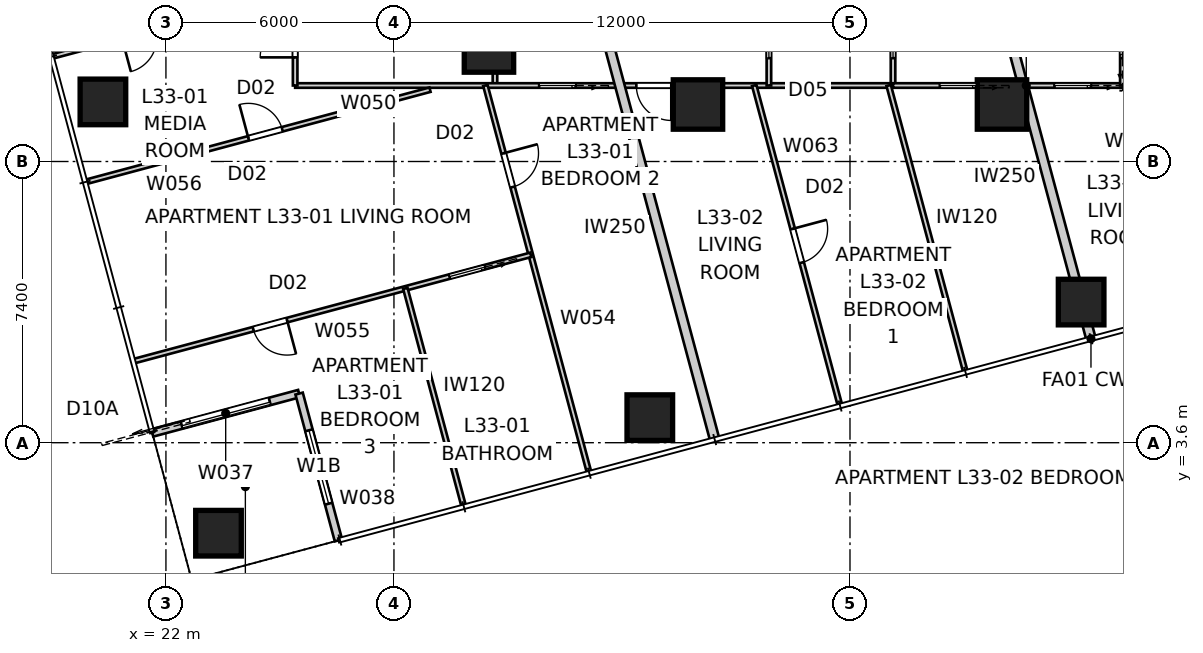
"""IFC4 building model, lengths in metres.
Left out: names, types, materials, properties, quantities, classifications, styles, units other than length and angle.
Written with IfcOpenShell. Run it as: python <this file> out.ifc"""

import sys

from ifc_helpers import new_model, si_unit, direction, frame, frame_2d, origin, origin_2d, place, context, subcontext, project, spatial, rectangle, extrude, element, fill, save


model = new_model("IFC4")
c1 = context("Model", 3, precision=1e-05, world=origin(), true_north=direction((0.0, 1.0)))
c2 = subcontext(c1, "Body", "Model", "MODEL_VIEW")
j1 = project(units=[si_unit("LENGTHUNIT", "METRE"), si_unit("PLANEANGLEUNIT", "RADIAN")], contexts=[c1])
p1 = place(None, origin())
s1 = spatial("IfcSite", under=j1, at=p1, CompositionType="ELEMENT")
p2 = place(p1, origin())
s2 = spatial("IfcBuilding", under=s1, at=p2, CompositionType="ELEMENT")
p3 = place(p2, frame((0.0, 0.0, 121.8)))
s3 = spatial("IfcBuildingStorey", under=s2, at=p3, CompositionType="ELEMENT", Elevation=121.8)
for number, where, z_axis, x_axis in (
    (1, (23.383, 1.219, 0.0), (0.0, 0.0, 1.0), (1.0, 0.0, 0.0)),
    (2, (34.733, 4.26, 0.0), (0.0, 0.0, 1.0), (1.0, 0.0, 0.0)),
    (3, (46.082, 7.301, 0.0), (0.0, 0.0, 1.0), (1.0, 0.0, 0.0)),
    (4, (20.342, 12.568, 0.0), (0.0, 0.0, 1.0), (1.0, 0.0, 0.0)),
):
    element("IfcColumn", number, at=place(p3, frame(where, z_axis=z_axis, x_axis=x_axis)), inside=s3, PredefinedType="COLUMN", context=c2, shape_type="SweptSolid", body=[
        extrude(rectangle(XDim=1.2, YDim=1.2, at=origin_2d()), origin(), (0.0, 0.0, 1.0), 3.4),
    ])
for number, where, z_axis, x_axis in (
    (5, (30.5, 14.0, 0.0), (0.0, 0.0, 1.0), (1.0, 0.0, 0.0)),
    (6, (36.0, 12.5, 0.0), (0.0, 0.0, 1.0), (1.0, 0.0, 0.0)),
    (7, (44.0, 12.5, 0.0), (0.0, 0.0, 1.0), (1.0, 0.0, 0.0)),
):
    element("IfcColumn", number, at=place(p3, frame(where, z_axis=z_axis, x_axis=x_axis)), inside=s3, PredefinedType="COLUMN", context=c2, shape_type="SweptSolid", body=[
        extrude(rectangle(XDim=1.3, YDim=1.3, at=origin_2d()), origin(), (0.0, 0.0, 1.0), 3.4),
    ])
p4 = place(p3, frame((21.641, 3.857, 0.0), z_axis=(0.0, 0.0, 1.0), x_axis=(0.965919172068, 0.258843877716, 0.0)))
e8 = element("IfcWall", 8, at=p4, inside=s3, PredefinedType="SOLIDWALL", context=c2, shape_type="SweptSolid", body=[
    extrude(rectangle(XDim=4.0, YDim=0.2, at=frame_2d((2.0, 0.0))), origin(), (0.0, 0.0, 1.0), 3.25),
])
p5 = place(p4, frame((0.8, 0.0, 0.0)))
e9 = element("IfcOpeningElement", 9, at=p5, cuts=e8, PredefinedType="OPENING", context=c2, shape_type="SweptSolid", body=[
    extrude(rectangle(XDim=2.4, YDim=2.1, at=frame_2d((1.2, 1.05))), frame((0.0, 0.11, 0.0), z_axis=(0.0, -1.0, 0.0), x_axis=(1.0, 0.0, 0.0)), (0.0, 0.0, 1.0), 0.22),
])
p6 = place(p3, frame((25.504, 4.893, 0.0), z_axis=(0.0, 0.0, 1.0), x_axis=(0.258786931944, -0.965934430412, 0.0)))
e10 = element("IfcWall", 10, at=p6, inside=s3, PredefinedType="SOLIDWALL", context=c2, shape_type="SweptSolid", body=[
    extrude(rectangle(XDim=4.0, YDim=0.2, at=frame_2d((2.0, 0.0))), origin(), (0.0, 0.0, 1.0), 3.25),
])
p7 = place(p6, frame((1.0, 0.0, 0.45)))
e11 = element("IfcOpeningElement", 11, at=p7, cuts=e10, PredefinedType="OPENING", context=c2, shape_type="SweptSolid", body=[
    extrude(rectangle(XDim=2.0, YDim=1.8, at=frame_2d((1.0, 0.9))), frame((0.0, 0.11, 0.0), z_axis=(0.0, -1.0, 0.0), x_axis=(1.0, 0.0, 0.0)), (0.0, 0.0, 1.0), 0.22),
])
p8 = place(p3, frame((36.44, 3.682, 0.0), z_axis=(0.0, 0.0, 1.0), x_axis=(-0.258824223352, 0.965924438766, 0.0)))
e12 = element("IfcWall", 12, at=p8, inside=s3, PredefinedType="PARTITIONING", context=c2, shape_type="SweptSolid", body=[
    extrude(rectangle(XDim=12.138, YDim=0.25, at=frame_2d((6.069, 0.0))), origin(), (0.0, 0.0, 1.0), 3.25),
])
p9 = place(p3, frame((46.341, 6.335, 0.0), z_axis=(0.0, 0.0, 1.0), x_axis=(-0.258814481793, 0.965927049013, 0.0)))
e13 = element("IfcWall", 13, at=p9, inside=s3, PredefinedType="PARTITIONING", context=c2, shape_type="SweptSolid", body=[
    extrude(rectangle(XDim=9.392, YDim=0.25, at=frame_2d((4.696, 0.0))), origin(), (0.0, 0.0, 1.0), 3.25),
])
p10 = place(p3, frame((30.658, 15.4, 0.0), z_axis=(0.0, 0.0, 1.0), x_axis=(0.0, -1.0, 0.0)))
e14 = element("IfcWall", 14, at=p10, inside=s3, PredefinedType="PARTITIONING", context=c2, shape_type="SweptSolid", body=[
    extrude(rectangle(XDim=2.4, YDim=0.12, at=frame_2d((1.2, 0.0))), origin(), (0.0, 0.0, 1.0), 3.25),
])
p11 = place(p3, frame((41.07, 13.0, 0.0), z_axis=(0.0, 0.0, 1.0), x_axis=(-1.0, 0.0, 0.0)))
e15 = element("IfcWall", 15, at=p11, inside=s3, PredefinedType="PARTITIONING", context=c2, shape_type="SweptSolid", body=[
    extrude(rectangle(XDim=15.67, YDim=0.12, at=frame_2d((7.835, 0.0))), origin(), (0.0, 0.0, 1.0), 2.55),
])
p12 = place(p11, frame((5.772, 0.0, 0.0)))
e16 = element("IfcOpeningElement", 16, at=p12, cuts=e15, PredefinedType="OPENING", context=c2, shape_type="SweptSolid", body=[
    extrude(rectangle(XDim=0.92, YDim=2.34, at=frame_2d((0.46, 1.17))), frame((0.0, 0.07, 0.0), z_axis=(0.0, -1.0, 0.0), x_axis=(1.0, 0.0, 0.0)), (0.0, 0.0, 1.0), 0.14),
])
p13 = place(p11, frame((8.289, 0.0, 0.0)))
e17 = element("IfcOpeningElement", 17, at=p13, cuts=e15, PredefinedType="OPENING", context=c2, shape_type="SweptSolid", body=[
    extrude(rectangle(XDim=0.96, YDim=2.1, at=frame_2d((0.48, 1.05))), frame((0.0, 0.07, 0.0), z_axis=(0.0, -1.0, 0.0), x_axis=(1.0, 0.0, 0.0)), (0.0, 0.0, 1.0), 0.14),
])
p14 = place(p3, frame((25.4, 13.0, 0.0), z_axis=(0.0, 0.0, 1.0), x_axis=(0.0, 1.0, 0.0)))
e18 = element("IfcWall", 18, at=p14, inside=s3, PredefinedType="PARTITIONING", context=c2, shape_type="SweptSolid", body=[
    extrude(rectangle(XDim=2.5, YDim=0.12, at=frame_2d((1.25, 0.0))), origin(), (0.0, 0.0, 1.0), 3.25),
])
p15 = place(p14, frame((0.74, 0.0, 0.0)))
e19 = element("IfcOpeningElement", 19, at=p15, cuts=e18, PredefinedType="OPENING", context=c2, shape_type="SweptSolid", body=[
    extrude(rectangle(XDim=0.92, YDim=2.34, at=frame_2d((0.46, 1.17))), frame((0.0, 0.07, 0.0), z_axis=(0.0, -1.0, 0.0), x_axis=(1.0, 0.0, 0.0)), (0.0, 0.0, 1.0), 0.14),
])
p16 = place(p3, frame((30.406, 13.0, 0.0), z_axis=(0.0, 0.0, 1.0), x_axis=(0.258819200315, -0.9659257847, 0.0)))
e20 = element("IfcWall", 20, at=p16, inside=s3, PredefinedType="PARTITIONING", context=c2, shape_type="SweptSolid", body=[
    extrude(rectangle(XDim=10.522, YDim=0.12, at=frame_2d((5.261, 0.0))), origin(), (0.0, 0.0, 1.0), 2.722),
])
p17 = place(p16, frame((1.846, 0.0, 0.0)))
e21 = element("IfcOpeningElement", 21, at=p17, cuts=e20, PredefinedType="OPENING", context=c2, shape_type="SweptSolid", body=[
    extrude(rectangle(XDim=0.92, YDim=2.34, at=frame_2d((0.46, 1.17))), frame((0.0, 0.07, 0.0), z_axis=(0.0, -1.0, 0.0), x_axis=(1.0, 0.0, 0.0)), (0.0, 0.0, 1.0), 0.14),
])
p18 = place(p3, frame((31.6, 8.544, 0.0), z_axis=(0.0, 0.0, 1.0), x_axis=(-0.965927151587, -0.258814098973, 0.0)))
e22 = element("IfcWall", 22, at=p18, inside=s3, PredefinedType="PARTITIONING", context=c2, shape_type="SweptSolid", body=[
    extrude(rectangle(XDim=10.793, YDim=0.12, at=frame_2d((5.396, 0.0))), origin(), (0.0, 0.0, 1.0), 3.25),
])
p19 = place(p18, frame((6.64, 0.0, 0.0)))
e23 = element("IfcOpeningElement", 23, at=p19, cuts=e22, PredefinedType="OPENING", context=c2, shape_type="SweptSolid", body=[
    extrude(rectangle(XDim=0.92, YDim=2.34, at=frame_2d((0.46, 1.17))), frame((0.0, 0.07, 0.0), z_axis=(0.0, -1.0, 0.0), x_axis=(1.0, 0.0, 0.0)), (0.0, 0.0, 1.0), 0.14),
])
p20 = place(p18, frame((1.253, 0.0, 0.0)))
e24 = element("IfcOpeningElement", 24, at=p20, cuts=e22, PredefinedType="OPENING", context=c2, shape_type="SweptSolid", body=[
    extrude(rectangle(XDim=0.96, YDim=2.1, at=frame_2d((0.48, 1.05))), frame((0.0, 0.07, 0.0), z_axis=(0.0, -1.0, 0.0), x_axis=(1.0, 0.0, 0.0)), (0.0, 0.0, 1.0), 0.14),
])
p21 = place(p3, frame((19.911, 10.468, 0.0), z_axis=(0.0, 0.0, 1.0), x_axis=(0.965927203676, 0.25881390457, 0.0)))
e25 = element("IfcWall", 25, at=p21, inside=s3, PredefinedType="PARTITIONING", context=c2, shape_type="SweptSolid", body=[
    extrude(rectangle(XDim=9.357, YDim=0.12, at=frame_2d((4.678, 0.0))), origin(), (0.0, 0.0, 1.0), 2.638),
])
p22 = place(p21, frame((4.411, 0.0, 0.0)))
e26 = element("IfcOpeningElement", 26, at=p22, cuts=e25, PredefinedType="OPENING", context=c2, shape_type="SweptSolid", body=[
    extrude(rectangle(XDim=0.92, YDim=2.34, at=frame_2d((0.46, 1.17))), frame((0.0, 0.07, 0.0), z_axis=(0.0, -1.0, 0.0), x_axis=(1.0, 0.0, 0.0)), (0.0, 0.0, 1.0), 0.14),
])
p23 = place(p3, frame((23.0, 14.833, 0.0), z_axis=(0.0, 0.0, 1.0), x_axis=(-0.965927919062, -0.258811234642, 0.0)))
e27 = element("IfcWall", 27, at=p23, inside=s3, PredefinedType="PARTITIONING", context=c2, shape_type="SweptSolid", body=[
    extrude(rectangle(XDim=4.114, YDim=0.12, at=frame_2d((2.057, 0.0))), origin(), (0.0, 0.0, 1.0), 3.25),
])
p24 = place(p23, frame((1.317, 0.0, 0.0)))
e28 = element("IfcOpeningElement", 28, at=p24, cuts=e27, PredefinedType="OPENING", context=c2, shape_type="SweptSolid", body=[
    extrude(rectangle(XDim=0.92, YDim=2.34, at=frame_2d((0.46, 1.17))), frame((0.0, 0.07, 0.0), z_axis=(0.0, -1.0, 0.0), x_axis=(1.0, 0.0, 0.0)), (0.0, 0.0, 1.0), 0.14),
])
p25 = place(p3, frame((28.3, 7.66, 0.0), z_axis=(0.0, 0.0, 1.0), x_axis=(0.25882212607, -0.965925000741, 0.0)))
e29 = element("IfcWall", 29, at=p25, inside=s3, PredefinedType="PARTITIONING", context=c2, shape_type="SweptSolid", body=[
    extrude(rectangle(XDim=5.91, YDim=0.12, at=frame_2d((2.955, 0.0))), origin(), (0.0, 0.0, 1.0), 3.25),
])
p26 = place(p3, frame((37.866, 15.4, 0.0), z_axis=(0.0, 0.0, 1.0), x_axis=(0.0, -1.0, 0.0)))
e30 = element("IfcWall", 30, at=p26, inside=s3, PredefinedType="PARTITIONING", context=c2, shape_type="SweptSolid", body=[
    extrude(rectangle(XDim=2.4, YDim=0.12, at=frame_2d((1.2, 0.0))), origin(), (0.0, 0.0, 1.0), 3.25),
])
p27 = place(p26, frame((0.72, 0.0, 0.0)))
e31 = element("IfcOpeningElement", 31, at=p27, cuts=e30, PredefinedType="OPENING", context=c2, shape_type="SweptSolid", body=[
    extrude(rectangle(XDim=0.96, YDim=2.1, at=frame_2d((0.48, 1.05))), frame((0.0, 0.07, 0.0), z_axis=(0.0, -1.0, 0.0), x_axis=(1.0, 0.0, 0.0)), (0.0, 0.0, 1.0), 0.14),
])
p28 = place(p3, frame((41.132, 15.4, 0.0), z_axis=(0.0, 0.0, 1.0), x_axis=(0.0, -1.0, 0.0)))
e32 = element("IfcWall", 32, at=p28, inside=s3, PredefinedType="PARTITIONING", context=c2, shape_type="SweptSolid", body=[
    extrude(rectangle(XDim=2.4, YDim=0.12, at=frame_2d((1.2, 0.0))), origin(), (0.0, 0.0, 1.0), 3.25),
])
p29 = place(p28, frame((0.72, 0.0, 0.0)))
e33 = element("IfcOpeningElement", 33, at=p29, cuts=e32, PredefinedType="OPENING", context=c2, shape_type="SweptSolid", body=[
    extrude(rectangle(XDim=0.96, YDim=2.1, at=frame_2d((0.48, 1.05))), frame((0.0, 0.07, 0.0), z_axis=(0.0, -1.0, 0.0), x_axis=(1.0, 0.0, 0.0)), (0.0, 0.0, 1.0), 0.14),
])
p30 = place(p3, frame((48.144, 13.0, 0.0), z_axis=(0.0, 0.0, 1.0), x_axis=(-1.0, 0.0, 0.0)))
e34 = element("IfcWall", 34, at=p30, inside=s3, PredefinedType="PARTITIONING", context=c2, shape_type="SweptSolid", body=[
    extrude(rectangle(XDim=7.012, YDim=0.12, at=frame_2d((3.506, 0.0))), origin(), (0.0, 0.0, 1.0), 2.55),
])
p31 = place(p30, frame((1.803, 0.0, 0.0)))
e35 = element("IfcOpeningElement", 35, at=p31, cuts=e34, PredefinedType="OPENING", context=c2, shape_type="SweptSolid", body=[
    extrude(rectangle(XDim=0.96, YDim=2.1, at=frame_2d((0.48, 1.05))), frame((0.0, 0.07, 0.0), z_axis=(0.0, -1.0, 0.0), x_axis=(1.0, 0.0, 0.0)), (0.0, 0.0, 1.0), 0.14),
])
p32 = place(p30, frame((4.82, 0.0, 0.0)))
e36 = element("IfcOpeningElement", 36, at=p32, cuts=e34, PredefinedType="OPENING", context=c2, shape_type="SweptSolid", body=[
    extrude(rectangle(XDim=0.96, YDim=2.1, at=frame_2d((0.48, 1.05))), frame((0.0, 0.07, 0.0), z_axis=(0.0, -1.0, 0.0), x_axis=(1.0, 0.0, 0.0)), (0.0, 0.0, 1.0), 0.14),
])
p33 = place(p3, frame((37.481, 13.0, 0.0), z_axis=(0.0, 0.0, 1.0), x_axis=(0.258819860698, -0.965925607751, 0.0)))
e37 = element("IfcWall", 37, at=p33, inside=s3, PredefinedType="PARTITIONING", context=c2, shape_type="SweptSolid", body=[
    extrude(rectangle(XDim=8.691, YDim=0.12, at=frame_2d((4.346, 0.0))), origin(), (0.0, 0.0, 1.0), 3.25),
])
p34 = place(p33, frame((3.906, 0.0, 0.0)))
e38 = element("IfcOpeningElement", 38, at=p34, cuts=e37, PredefinedType="OPENING", context=c2, shape_type="SweptSolid", body=[
    extrude(rectangle(XDim=0.92, YDim=2.34, at=frame_2d((0.46, 1.17))), frame((0.0, 0.07, 0.0), z_axis=(0.0, -1.0, 0.0), x_axis=(1.0, 0.0, 0.0)), (0.0, 0.0, 1.0), 0.14),
])
p35 = place(p3, frame((41.018, 13.0, 0.0), z_axis=(0.0, 0.0, 1.0), x_axis=(0.258813509689, -0.965927309482, 0.0)))
e39 = element("IfcWall", 39, at=p35, inside=s3, PredefinedType="PARTITIONING", context=c2, shape_type="SweptSolid", body=[
    extrude(rectangle(XDim=7.776, YDim=0.12, at=frame_2d((3.888, 0.0))), origin(), (0.0, 0.0, 1.0), 3.25),
])
p36 = place(p3, frame((47.167, 13.0, 0.0), z_axis=(0.0, 0.0, 1.0), x_axis=(0.0, 1.0, 0.0)))
e40 = element("IfcWall", 40, at=p36, inside=s3, PredefinedType="PARTITIONING", context=c2, shape_type="SweptSolid", body=[
    extrude(rectangle(XDim=2.4, YDim=0.12, at=frame_2d((1.2, 0.0))), origin(), (0.0, 0.0, 1.0), 3.25),
])
p37 = place(p36, frame((0.72, 0.0, 0.0)))
e41 = element("IfcOpeningElement", 41, at=p37, cuts=e40, PredefinedType="OPENING", context=c2, shape_type="SweptSolid", body=[
    extrude(rectangle(XDim=0.96, YDim=2.1, at=frame_2d((0.48, 1.05))), frame((0.0, 0.07, 0.0), z_axis=(0.0, -1.0, 0.0), x_axis=(1.0, 0.0, 0.0)), (0.0, 0.0, 1.0), 0.14),
])
p38 = place(p5, origin())
e42 = element("IfcDoor", 42, at=p38, inside=s3, OperationType="SLIDING_TO_LEFT", PredefinedType="DOOR", context=c2, shape_type="SweptSolid", body=[
    extrude(rectangle(XDim=2.4, YDim=2.1, at=frame_2d((1.2, 1.05))), frame((0.0, 0.025, 0.0), z_axis=(0.0, -1.0, 0.0), x_axis=(1.0, 0.0, 0.0)), (0.0, 0.0, 1.0), 0.05),
])
fill(e9, e42)
p39 = place(p7, origin())
e43 = element("IfcWindow", 43, at=p39, inside=s3, PartitioningType="SINGLE_PANEL", PredefinedType="WINDOW", context=c2, shape_type="SweptSolid", body=[
    extrude(rectangle(XDim=2.0, YDim=1.8, at=frame_2d((1.0, 0.9))), frame((0.0, 0.03, 0.0), z_axis=(0.0, -1.0, 0.0), x_axis=(1.0, 0.0, 0.0)), (0.0, 0.0, 1.0), 0.06),
])
fill(e11, e43)
p40 = place(p15, origin())
e44 = element("IfcDoor", 44, at=p40, inside=s3, OperationType="SINGLE_SWING_LEFT", PredefinedType="DOOR", context=c2, shape_type="SweptSolid", body=[
    extrude(rectangle(XDim=0.92, YDim=2.34, at=frame_2d((0.46, 1.17))), frame((0.0, 0.025, 0.0), z_axis=(0.0, -1.0, 0.0), x_axis=(1.0, 0.0, 0.0)), (0.0, 0.0, 1.0), 0.05),
])
fill(e19, e44)
p41 = place(p12, origin())
e45 = element("IfcDoor", 45, at=p41, inside=s3, OperationType="SINGLE_SWING_LEFT", PredefinedType="DOOR", context=c2, shape_type="SweptSolid", body=[
    extrude(rectangle(XDim=0.92, YDim=2.34, at=frame_2d((0.46, 1.17))), frame((0.0, 0.025, 0.0), z_axis=(0.0, -1.0, 0.0), x_axis=(1.0, 0.0, 0.0)), (0.0, 0.0, 1.0), 0.05),
])
fill(e16, e45)
p42 = place(p27, origin())
e46 = element("IfcDoor", 46, at=p42, inside=s3, OperationType="SLIDING_TO_LEFT", PredefinedType="DOOR", context=c2, shape_type="SweptSolid", body=[
    extrude(rectangle(XDim=0.96, YDim=2.1, at=frame_2d((0.48, 1.05))), frame((0.0, 0.025, 0.0), z_axis=(0.0, -1.0, 0.0), x_axis=(1.0, 0.0, 0.0)), (0.0, 0.0, 1.0), 0.05),
])
fill(e31, e46)
p43 = place(p37, origin())
e47 = element("IfcDoor", 47, at=p43, inside=s3, OperationType="SLIDING_TO_LEFT", PredefinedType="DOOR", context=c2, shape_type="SweptSolid", body=[
    extrude(rectangle(XDim=0.96, YDim=2.1, at=frame_2d((0.48, 1.05))), frame((0.0, 0.025, 0.0), z_axis=(0.0, -1.0, 0.0), x_axis=(1.0, 0.0, 0.0)), (0.0, 0.0, 1.0), 0.05),
])
fill(e41, e47)
p44 = place(p22, origin())
e48 = element("IfcDoor", 48, at=p44, inside=s3, OperationType="SINGLE_SWING_LEFT", PredefinedType="DOOR", context=c2, shape_type="SweptSolid", body=[
    extrude(rectangle(XDim=0.92, YDim=2.34, at=frame_2d((0.46, 1.17))), frame((0.0, 0.025, 0.0), z_axis=(0.0, -1.0, 0.0), x_axis=(1.0, 0.0, 0.0)), (0.0, 0.0, 1.0), 0.05),
])
fill(e26, e48)
p45 = place(p34, origin())
e49 = element("IfcDoor", 49, at=p45, inside=s3, OperationType="SINGLE_SWING_LEFT", PredefinedType="DOOR", context=c2, shape_type="SweptSolid", body=[
    extrude(rectangle(XDim=0.92, YDim=2.34, at=frame_2d((0.46, 1.17))), frame((0.0, 0.025, 0.0), z_axis=(0.0, -1.0, 0.0), x_axis=(1.0, 0.0, 0.0)), (0.0, 0.0, 1.0), 0.05),
])
fill(e38, e49)
p46 = place(p29, origin())
e50 = element("IfcDoor", 50, at=p46, inside=s3, OperationType="SLIDING_TO_LEFT", PredefinedType="DOOR", context=c2, shape_type="SweptSolid", body=[
    extrude(rectangle(XDim=0.96, YDim=2.1, at=frame_2d((0.48, 1.05))), frame((0.0, 0.025, 0.0), z_axis=(0.0, -1.0, 0.0), x_axis=(1.0, 0.0, 0.0)), (0.0, 0.0, 1.0), 0.05),
])
fill(e33, e50)
p47 = place(p31, origin())
e51 = element("IfcDoor", 51, at=p47, inside=s3, OperationType="SLIDING_TO_LEFT", PredefinedType="DOOR", context=c2, shape_type="SweptSolid", body=[
    extrude(rectangle(XDim=0.96, YDim=2.1, at=frame_2d((0.48, 1.05))), frame((0.0, 0.025, 0.0), z_axis=(0.0, -1.0, 0.0), x_axis=(1.0, 0.0, 0.0)), (0.0, 0.0, 1.0), 0.05),
])
fill(e35, e51)
p48 = place(p19, origin())
e52 = element("IfcDoor", 52, at=p48, inside=s3, OperationType="SINGLE_SWING_LEFT", PredefinedType="DOOR", context=c2, shape_type="SweptSolid", body=[
    extrude(rectangle(XDim=0.92, YDim=2.34, at=frame_2d((0.46, 1.17))), frame((0.0, 0.025, 0.0), z_axis=(0.0, -1.0, 0.0), x_axis=(1.0, 0.0, 0.0)), (0.0, 0.0, 1.0), 0.05),
])
fill(e23, e52)
p49 = place(p17, origin())
e53 = element("IfcDoor", 53, at=p49, inside=s3, OperationType="SINGLE_SWING_LEFT", PredefinedType="DOOR", context=c2, shape_type="SweptSolid", body=[
    extrude(rectangle(XDim=0.92, YDim=2.34, at=frame_2d((0.46, 1.17))), frame((0.0, 0.025, 0.0), z_axis=(0.0, -1.0, 0.0), x_axis=(1.0, 0.0, 0.0)), (0.0, 0.0, 1.0), 0.05),
])
fill(e21, e53)
p50 = place(p20, origin())
e54 = element("IfcDoor", 54, at=p50, inside=s3, OperationType="SLIDING_TO_LEFT", PredefinedType="DOOR", context=c2, shape_type="SweptSolid", body=[
    extrude(rectangle(XDim=0.96, YDim=2.1, at=frame_2d((0.48, 1.05))), frame((0.0, 0.025, 0.0), z_axis=(0.0, -1.0, 0.0), x_axis=(1.0, 0.0, 0.0)), (0.0, 0.0, 1.0), 0.05),
])
fill(e24, e54)
p51 = place(p32, origin())
e55 = element("IfcDoor", 55, at=p51, inside=s3, OperationType="SLIDING_TO_LEFT", PredefinedType="DOOR", context=c2, shape_type="SweptSolid", body=[
    extrude(rectangle(XDim=0.96, YDim=2.1, at=frame_2d((0.48, 1.05))), frame((0.0, 0.025, 0.0), z_axis=(0.0, -1.0, 0.0), x_axis=(1.0, 0.0, 0.0)), (0.0, 0.0, 1.0), 0.05),
])
fill(e36, e55)
p52 = place(p13, origin())
e56 = element("IfcDoor", 56, at=p52, inside=s3, OperationType="SLIDING_TO_LEFT", PredefinedType="DOOR", context=c2, shape_type="SweptSolid", body=[
    extrude(rectangle(XDim=0.96, YDim=2.1, at=frame_2d((0.48, 1.05))), frame((0.0, 0.025, 0.0), z_axis=(0.0, -1.0, 0.0), x_axis=(1.0, 0.0, 0.0)), (0.0, 0.0, 1.0), 0.05),
])
fill(e17, e56)
save(model, sys.argv[1])
